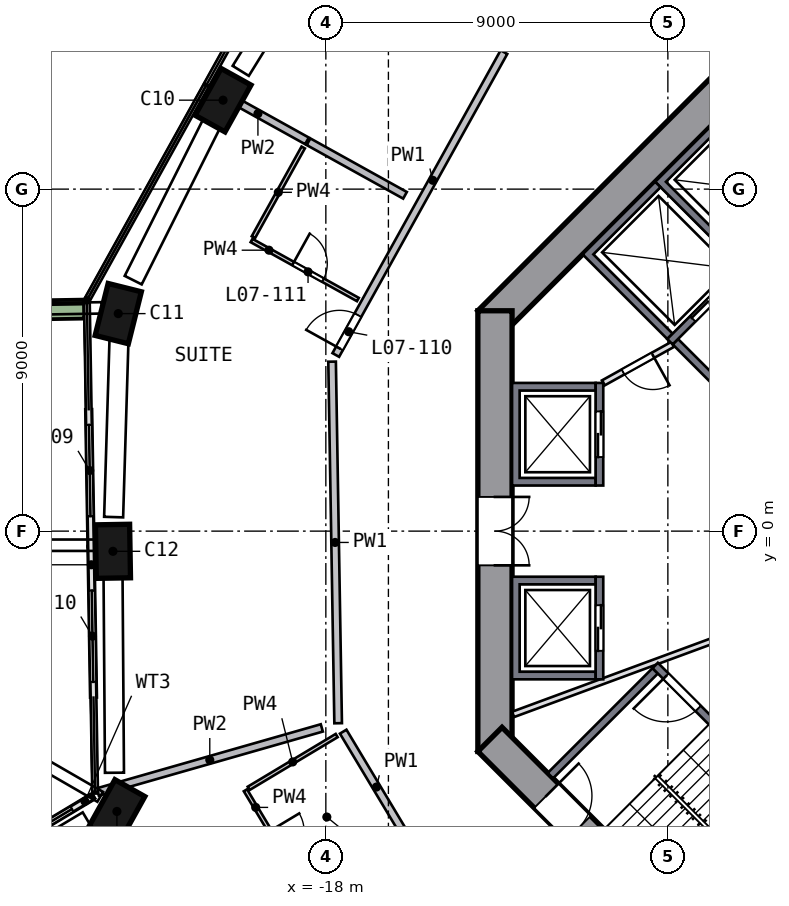
"""IFC4 building model, lengths in metres.
Left out: names, types, materials, properties, quantities, classifications, styles, units other than length and angle.
Written with IfcOpenShell. Run it as: python <this file> out.ifc"""

import sys

from ifc_helpers import new_model, si_unit, direction, frame, frame_2d, origin, origin_2d, place, context, subcontext, project, spatial, polyline, rectangle, outline, extrude, element, fill, save


model = new_model("IFC4")
c1 = context("Model", 3, precision=1e-05, world=origin(), true_north=direction((0.0, 1.0)))
c2 = subcontext(c1, "Body", "Model", "MODEL_VIEW")
j1 = project(units=[si_unit("LENGTHUNIT", "METRE"), si_unit("PLANEANGLEUNIT", "RADIAN")], contexts=[c1])
p1 = place(None, origin())
s1 = spatial("IfcSite", under=j1, at=p1, CompositionType="ELEMENT")
p2 = place(p1, origin())
s2 = spatial("IfcBuilding", under=s1, at=p2, CompositionType="ELEMENT")
p3 = place(p2, frame((0.0, 0.0, 39.0)))
s3 = spatial("IfcBuildingStorey", under=s2, at=p3, CompositionType="ELEMENT", Elevation=39.0)
p4 = place(p3, frame((-20.64, 11.46, 0.0), z_axis=(-0.053691551, -0.098637311, 0.99367394), x_axis=(-0.482457023, -0.868690978, -0.112299622)))
e1 = element("IfcColumn", 1, at=p4, inside=s3, PredefinedType="COLUMN", context=c2, shape_type="SweptSolid", body=[
    extrude(rectangle(XDim=1.4, YDim=0.9, at=origin_2d()), origin(), (0.0, 0.0, 1.0), 3.21),
])
p5 = place(p3, frame((-23.43, 5.859, 0.0), z_axis=(-0.026989812, -0.1116846, 0.993377119), x_axis=(0.241532608, 0.963566831, 0.114895435)))
e2 = element("IfcColumn", 2, at=p5, inside=s3, PredefinedType="COLUMN", context=c2, shape_type="SweptSolid", body=[
    extrude(rectangle(XDim=1.4, YDim=0.9, at=origin_2d()), origin(), (0.0, 0.0, 1.0), 3.211),
])
p6 = place(p3, frame((-23.605, -0.396, 0.0), z_axis=(0.002813845, -0.112325643, 0.993667466), x_axis=(0.016454511, -0.99353167, -0.112356888)))
e3 = element("IfcColumn", 3, at=p6, inside=s3, PredefinedType="COLUMN", context=c2, shape_type="SweptSolid", body=[
    extrude(rectangle(XDim=1.4, YDim=0.9, at=origin_2d()), origin(), (0.0, 0.0, 1.0), 3.21),
])
p7 = place(p3, frame((-23.54, -7.242, 0.0), z_axis=(0.035343639, -0.111655497, 0.993118259), x_axis=(0.490078093, 0.867986237, 0.080145834)))
e4 = element("IfcColumn", 4, at=p7, inside=s3, PredefinedType="COLUMN", context=c2, shape_type="SweptSolid", body=[
    extrude(rectangle(XDim=1.4, YDim=0.9, at=origin_2d()), origin(), (0.0, 0.0, 1.0), 3.212),
])
p8 = place(p3, frame((-5.481, 13.682, 0.0), z_axis=(0.0, 0.0, 1.0), x_axis=(-0.707106781, -0.707106781, 0.0)))
e5 = element("IfcWall", 5, at=p8, inside=s3, PredefinedType="SHEAR", context=c2, shape_type="SweptSolid", body=[
    extrude(rectangle(XDim=11.598, YDim=0.9, at=frame_2d((5.799, 0.0))), origin(), (0.0, 0.0, 1.0), 3.5),
])
p9 = place(p3, frame((-13.55, 5.799, 0.0), z_axis=(0.0, 0.0, 1.0), x_axis=(0.0, -1.0, 0.0)))
e6 = element("IfcWall", 6, at=p9, inside=s3, PredefinedType="SHEAR", context=c2, shape_type="SweptSolid", body=[
    extrude(rectangle(XDim=11.598, YDim=0.9, at=frame_2d((5.799, 0.0))), origin(), (0.0, 0.0, 1.0), 3.5),
])
p10 = place(p9, frame((4.899, 0.0, 0.0)))
e7 = element("IfcOpeningElement", 7, at=p10, cuts=e6, PredefinedType="OPENING", context=c2, shape_type="SweptSolid", body=[
    extrude(rectangle(XDim=1.8, YDim=2.1, at=frame_2d((0.9, 1.05))), frame((0.0, 0.46, 0.0), z_axis=(0.0, -1.0, 0.0), x_axis=(1.0, 0.0, 0.0)), (0.0, 0.0, 1.0), 0.92),
])
p11 = place(p3, frame((-13.682, -5.481, 0.0), z_axis=(0.0, 0.0, 1.0), x_axis=(0.707106781, -0.707106781, 0.0)))
e8 = element("IfcWall", 8, at=p11, inside=s3, PredefinedType="SHEAR", context=c2, shape_type="SweptSolid", body=[
    extrude(rectangle(XDim=11.598, YDim=0.9, at=frame_2d((5.799, 0.0))), origin(), (0.0, 0.0, 1.0), 3.5),
])
p12 = place(p11, frame((2.099, 0.0, 0.0)))
e9 = element("IfcOpeningElement", 9, at=p12, cuts=e8, PredefinedType="OPENING", context=c2, shape_type="SweptSolid", body=[
    extrude(rectangle(XDim=1.2, YDim=2.1, at=frame_2d((0.6, 1.05))), frame((0.0, 0.46, 0.0), z_axis=(0.0, -1.0, 0.0), x_axis=(1.0, 0.0, 0.0)), (0.0, 0.0, 1.0), 0.92),
])
p13 = place(p3, frame((-24.24, 3.194, 0.0), z_axis=(0.0, 0.0, 1.0), x_axis=(0.016750227, -0.999859705, 0.0)))
e10 = element("IfcWall", 10, at=p13, inside=s3, PredefinedType="SOLIDWALL", context=c2, shape_type="SweptSolid", body=[
    extrude(rectangle(XDim=3.6, YDim=0.15, at=frame_2d((1.8, 0.0))), origin(), (0.0, 0.0, 1.0), 2.425),
])
p14 = place(p13, frame((0.4, 0.0, 0.0)))
e11 = element("IfcOpeningElement", 11, at=p14, cuts=e10, PredefinedType="OPENING", context=c2, shape_type="SweptSolid", body=[
    extrude(rectangle(XDim=2.4, YDim=2.4, at=frame_2d((1.2, 1.2))), frame((0.0, 0.085, 0.0), z_axis=(0.0, -1.0, 0.0), x_axis=(1.0, 0.0, 0.0)), (0.0, 0.0, 1.0), 0.17),
])
p15 = place(p3, frame((-24.18, -0.405, 0.0), z_axis=(0.0, 0.0, 1.0), x_axis=(0.016767063, -0.999859423, 0.0)))
e12 = element("IfcWall", 12, at=p15, inside=s3, PredefinedType="SOLIDWALL", context=c2, shape_type="SweptSolid", body=[
    extrude(rectangle(XDim=3.96, YDim=0.15, at=frame_2d((1.98, 0.0))), origin(), (0.0, 0.0, 1.0), 2.425),
])
p16 = place(p15, frame((1.16, 0.0, 0.0)))
e13 = element("IfcOpeningElement", 13, at=p16, cuts=e12, PredefinedType="OPENING", context=c2, shape_type="SweptSolid", body=[
    extrude(rectangle(XDim=2.4, YDim=2.4, at=frame_2d((1.2, 1.2))), frame((0.0, 0.085, 0.0), z_axis=(0.0, -1.0, 0.0), x_axis=(1.0, 0.0, 0.0)), (0.0, 0.0, 1.0), 0.17),
])
p17 = place(p3, frame((-24.167, -7.006, 0.0), z_axis=(0.0, 0.0, 1.0), x_axis=(-0.857537249, -0.514421876, 0.0)))
e14 = element("IfcWall", 14, at=p17, inside=s3, PredefinedType="SOLIDWALL", context=c2, shape_type="SweptSolid", body=[
    extrude(rectangle(XDim=3.402, YDim=0.15, at=frame_2d((1.701, 0.0))), origin(), (0.0, 0.0, 1.0), 2.425),
])
p18 = place(p17, frame((0.602, 0.0, 0.0)))
e15 = element("IfcOpeningElement", 15, at=p18, cuts=e14, PredefinedType="OPENING", context=c2, shape_type="SweptSolid", body=[
    extrude(rectangle(XDim=2.4, YDim=2.4, at=frame_2d((1.2, 1.2))), frame((0.0, 0.085, 0.0), z_axis=(0.0, -1.0, 0.0), x_axis=(1.0, 0.0, 0.0)), (0.0, 0.0, 1.0), 0.17),
])
p19 = place(p3, frame((-24.361, 5.843, 0.0), z_axis=(0.0, 0.0, 1.0), x_axis=(-0.999859034, -0.016790244, 0.0)))
e16 = element("IfcWall", 16, at=p19, inside=s3, PredefinedType="SOLIDWALL", context=c2, shape_type="SweptSolid", body=[
    extrude(rectangle(XDim=3.199, YDim=0.5, at=frame_2d((1.6, 0.0))), origin(), (0.0, 0.0, 1.0), 0.7),
])
p20 = place(p3, origin())
e17 = element("IfcWall", 17, at=p20, inside=s3, PredefinedType="SOLIDWALL", context=c2, shape_type="SweptSolid", body=[
    extrude(outline(polyline([(-13.1, 3.9), (-10.9, 3.9), (-10.9, 3.7), (-12.9, 3.7), (-12.9, 1.4), (-10.9, 1.4), (-10.9, 1.2), (-13.1, 1.2), (-13.1, 3.9)])), origin(), (0.0, 0.0, 1.0), 3.19),
])
p21 = place(p3, frame((-10.8, 1.2, 0.0), z_axis=(0.0, 0.0, 1.0), x_axis=(0.0, 1.0, 0.0)))
e18 = element("IfcWall", 18, at=p21, inside=s3, PredefinedType="SOLIDWALL", context=c2, shape_type="SweptSolid", body=[
    extrude(rectangle(XDim=2.7, YDim=0.2, at=frame_2d((1.35, 0.0))), origin(), (0.0, 0.0, 1.0), 3.19),
])
p22 = place(p21, frame((0.75, 0.0, 0.0)))
e19 = element("IfcOpeningElement", 19, at=p22, cuts=e18, PredefinedType="OPENING", context=c2, shape_type="SweptSolid", body=[
    extrude(rectangle(XDim=1.2, YDim=2.1, at=frame_2d((0.6, 1.05))), frame((0.0, 0.11, 0.0), z_axis=(0.0, -1.0, 0.0), x_axis=(1.0, 0.0, 0.0)), (0.0, 0.0, 1.0), 0.22),
])
p23 = place(p3, origin())
e20 = element("IfcWall", 20, at=p23, inside=s3, PredefinedType="SOLIDWALL", context=c2, shape_type="SweptSolid", body=[
    extrude(outline(polyline([(-13.1, -3.9), (-13.1, -1.2), (-10.9, -1.2), (-10.9, -1.4), (-12.9, -1.4), (-12.9, -3.7), (-10.9, -3.7), (-10.9, -3.9), (-13.1, -3.9)])), origin(), (0.0, 0.0, 1.0), 3.19),
])
p24 = place(p3, frame((-10.8, -1.2, 0.0), z_axis=(0.0, 0.0, 1.0), x_axis=(0.0, -1.0, 0.0)))
e21 = element("IfcWall", 21, at=p24, inside=s3, PredefinedType="SOLIDWALL", context=c2, shape_type="SweptSolid", body=[
    extrude(rectangle(XDim=2.7, YDim=0.2, at=frame_2d((1.35, 0.0))), origin(), (0.0, 0.0, 1.0), 3.19),
])
p25 = place(p24, frame((0.75, 0.0, 0.0)))
e22 = element("IfcOpeningElement", 22, at=p25, cuts=e21, PredefinedType="OPENING", context=c2, shape_type="SweptSolid", body=[
    extrude(rectangle(XDim=1.2, YDim=2.1, at=frame_2d((0.6, 1.05))), frame((0.0, 0.11, 0.0), z_axis=(0.0, -1.0, 0.0), x_axis=(1.0, 0.0, 0.0)), (0.0, 0.0, 1.0), 0.22),
])
p26 = place(p3, origin())
e23 = element("IfcWall", 23, at=p26, inside=s3, PredefinedType="SOLIDWALL", context=c2, shape_type="SweptSolid", body=[
    extrude(outline(polyline([(-9.334, 9.192), (-7.283, 11.243), (-5.056, 9.016), (-5.197, 8.874), (-7.283, 10.96), (-9.051, 9.192), (-6.965, 7.106), (-7.106, 6.965), (-9.334, 9.192)])), origin(), (0.0, 0.0, 1.0), 3.19),
])
p27 = place(p3, origin())
e24 = element("IfcWall", 24, at=p27, inside=s3, PredefinedType="SOLIDWALL", context=c2, shape_type="SweptSolid", body=[
    extrude(outline(polyline([(-11.243, 7.283), (-9.334, 9.192), (-9.192, 9.051), (-10.96, 7.283), (-8.874, 5.197), (-9.016, 5.056), (-11.243, 7.283)])), origin(), (0.0, 0.0, 1.0), 3.19),
])
p28 = place(p3, frame((-7.036, 6.894, 0.0), z_axis=(0.0, 0.0, 1.0), x_axis=(-0.707106781, -0.707106781, 0.0)))
e25 = element("IfcWall", 25, at=p28, inside=s3, PredefinedType="SOLIDWALL", context=c2, shape_type="SweptSolid", body=[
    extrude(rectangle(XDim=2.7, YDim=0.2, at=frame_2d((1.35, 0.0))), origin(), (0.0, 0.0, 1.0), 3.19),
])
p29 = place(p28, frame((0.65, 0.0, 0.0)))
e26 = element("IfcOpeningElement", 26, at=p29, cuts=e25, PredefinedType="OPENING", context=c2, shape_type="SweptSolid", body=[
    extrude(rectangle(XDim=1.2, YDim=2.1, at=frame_2d((0.6, 1.05))), frame((0.0, 0.11, 0.0), z_axis=(0.0, -1.0, 0.0), x_axis=(1.0, 0.0, 0.0)), (0.0, 0.0, 1.0), 0.22),
])
p30 = place(p3, frame((-3.535, -9.334, 0.0), z_axis=(0.0, 0.0, 1.0), x_axis=(-0.707106781, 0.707106781, 0.0)))
e27 = element("IfcWall", 27, at=p30, inside=s3, PredefinedType="SOLIDWALL", context=c2, shape_type="SweptSolid", body=[
    extrude(rectangle(XDim=8.2, YDim=0.2, at=frame_2d((4.1, 0.0))), origin(), (0.0, 0.0, 1.0), 3.19),
])
p31 = place(p30, frame((6.6, 0.0, 0.0)))
e28 = element("IfcOpeningElement", 28, at=p31, cuts=e27, PredefinedType="OPENING", context=c2, shape_type="SweptSolid", body=[
    extrude(rectangle(XDim=1.2, YDim=2.1, at=frame_2d((0.6, 1.05))), frame((0.0, 0.11, 0.0), z_axis=(0.0, -1.0, 0.0), x_axis=(1.0, 0.0, 0.0)), (0.0, 0.0, 1.0), 0.22),
])
p32 = place(p3, frame((-9.334, -3.677, 0.0), z_axis=(0.0, 0.0, 1.0), x_axis=(-0.707106781, -0.707106781, 0.0)))
e29 = element("IfcWall", 29, at=p32, inside=s3, PredefinedType="SOLIDWALL", context=c2, shape_type="SweptSolid", body=[
    extrude(rectangle(XDim=3.9, YDim=0.2, at=frame_2d((1.95, 0.0))), origin(), (0.0, 0.0, 1.0), 3.19),
])
p33 = place(p3, frame((-6.823, 3.005, 0.0), z_axis=(0.0, 0.0, 1.0), x_axis=(-0.707106781, 0.707106781, 0.0)))
e30 = element("IfcWall", 30, at=p33, inside=s3, PredefinedType="SOLIDWALL", context=c2, shape_type="SweptSolid", body=[
    extrude(rectangle(XDim=2.8, YDim=0.2, at=frame_2d((1.4, 0.0))), origin(), (0.0, 0.0, 1.0), 3.19),
])
p34 = place(p3, frame((-8.874, 4.914, 0.0), z_axis=(0.0, 0.0, 1.0), x_axis=(-0.874129705, -0.485692555, 0.0)))
e31 = element("IfcWall", 31, at=p34, inside=s3, PredefinedType="PARTITIONING", context=c2, shape_type="SweptSolid", body=[
    extrude(rectangle(XDim=2.089, YDim=0.15, at=frame_2d((1.044, 0.0))), origin(), (0.0, 0.0, 1.0), 3.19),
])
p35 = place(p34, frame((0.594, 0.0, 0.0)))
e32 = element("IfcOpeningElement", 32, at=p35, cuts=e31, PredefinedType="OPENING", context=c2, shape_type="SweptSolid", body=[
    extrude(rectangle(XDim=0.9, YDim=2.1, at=frame_2d((0.45, 1.05))), frame((0.0, 0.085, 0.0), z_axis=(0.0, -1.0, 0.0), x_axis=(1.0, 0.0, 0.0)), (0.0, 0.0, 1.0), 0.17),
])
p36 = place(p3, frame((-4.813, -1.776, 0.0), z_axis=(0.0, 0.0, 1.0), x_axis=(-0.93819293, -0.346112737, 0.0)))
e33 = element("IfcWall", 33, at=p36, inside=s3, PredefinedType="PARTITIONING", context=c2, shape_type="SweptSolid", body=[
    extrude(rectangle(XDim=8.803, YDim=0.15, at=frame_2d((4.402, 0.0))), origin(), (0.0, 0.0, 1.0), 3.19),
])
p37 = place(p36, frame((1.4, 0.0, 0.0)))
e34 = element("IfcOpeningElement", 34, at=p37, cuts=e33, PredefinedType="OPENING", context=c2, shape_type="SweptSolid", body=[
    extrude(rectangle(XDim=1.8, YDim=2.1, at=frame_2d((0.9, 1.05))), frame((0.0, 0.085, 0.0), z_axis=(0.0, -1.0, 0.0), x_axis=(1.0, 0.0, 0.0)), (0.0, 0.0, 1.0), 0.17),
])
p38 = place(p3, frame((-17.836, 4.46, 0.0), z_axis=(0.0, 0.0, 1.0), x_axis=(0.016778486, -0.999859231, 0.0)))
e35 = element("IfcWall", 35, at=p38, inside=s3, PredefinedType="SOLIDWALL", context=c2, shape_type="SweptSolid", body=[
    extrude(rectangle(XDim=9.516, YDim=0.2, at=frame_2d((4.758, 0.0))), origin(), (0.0, 0.0, 1.0), 3.19),
])
p39 = place(p3, frame((-17.543, -5.277, 0.0), z_axis=(0.0, 0.0, 1.0), x_axis=(0.514400718, -0.857549941, 0.0)))
e36 = element("IfcWall", 36, at=p39, inside=s3, PredefinedType="SOLIDWALL", context=c2, shape_type="SweptSolid", body=[
    extrude(rectangle(XDim=3.4, YDim=0.2, at=frame_2d((1.7, 0.0))), origin(), (0.0, 0.0, 1.0), 3.19),
])
p40 = place(p3, frame((-17.738, 4.635, 0.0), z_axis=(0.0, 0.0, 1.0), x_axis=(0.485438257, 0.874270953, 0.0)))
e37 = element("IfcWall", 37, at=p40, inside=s3, PredefinedType="SOLIDWALL", context=c2, shape_type="SweptSolid", body=[
    extrude(rectangle(XDim=9.115, YDim=0.2, at=frame_2d((4.558, 0.0))), origin(), (0.0, 0.0, 1.0), 3.19),
])
p41 = place(p40, frame((0.2, 0.0, 0.0)))
e38 = element("IfcOpeningElement", 38, at=p41, cuts=e37, PredefinedType="OPENING", context=c2, shape_type="SweptSolid", body=[
    extrude(rectangle(XDim=1.0, YDim=2.1, at=frame_2d((0.5, 1.05))), frame((0.0, 0.11, 0.0), z_axis=(0.0, -1.0, 0.0), x_axis=(1.0, 0.0, 0.0)), (0.0, 0.0, 1.0), 0.22),
])
p42 = place(p3, frame((-18.106, -5.178, 0.0), z_axis=(0.0, 0.0, 1.0), x_axis=(-0.961454804, -0.274963015, 0.0)))
e39 = element("IfcWall", 39, at=p42, inside=s3, PredefinedType="SOLIDWALL", context=c2, shape_type="SweptSolid", body=[
    extrude(rectangle(XDim=6.132, YDim=0.2, at=frame_2d((3.066, 0.0))), origin(), (0.0, 0.0, 1.0), 3.19),
])
p43 = place(p3, frame((-18.497, 10.27, 0.0), z_axis=(0.0, 0.0, 1.0), x_axis=(-0.874289886, 0.485404157, 0.0)))
e40 = element("IfcWall", 40, at=p43, inside=s3, PredefinedType="SOLIDWALL", context=c2, shape_type="SweptSolid", body=[
    extrude(rectangle(XDim=2.952, YDim=0.2, at=frame_2d((1.476, 0.0))), origin(), (0.0, 0.0, 1.0), 3.19),
])
p44 = place(p3, frame((-15.917, 8.837, 0.0), z_axis=(0.0, 0.0, 1.0), x_axis=(-0.874296003, 0.485393138, 0.0)))
e41 = element("IfcWall", 41, at=p44, inside=s3, PredefinedType="SOLIDWALL", context=c2, shape_type="SweptSolid", body=[
    extrude(rectangle(XDim=2.905, YDim=0.2, at=frame_2d((1.452, 0.0))), origin(), (0.0, 0.0, 1.0), 3.19),
])
p45 = place(p3, frame((-20.116, -6.82, 0.0), z_axis=(0.0, 0.0, 1.0), x_axis=(0.514439657, -0.857526582, 0.0)))
e42 = element("IfcWall", 42, at=p45, inside=s3, PredefinedType="PARTITIONING", context=c2, shape_type="SweptSolid", body=[
    extrude(rectangle(XDim=3.2, YDim=0.1, at=frame_2d((1.6, 0.0))), origin(), (0.0, 0.0, 1.0), 3.19),
])
p46 = place(p45, frame((1.25, 0.0, 0.0)))
e43 = element("IfcOpeningElement", 43, at=p46, cuts=e42, PredefinedType="OPENING", context=c2, shape_type="SweptSolid", body=[
    extrude(rectangle(XDim=0.9, YDim=2.1, at=frame_2d((0.45, 1.05))), frame((0.0, 0.06, 0.0), z_axis=(0.0, -1.0, 0.0), x_axis=(1.0, 0.0, 0.0)), (0.0, 0.0, 1.0), 0.12),
])
p47 = place(p3, frame((-19.906, 7.735, 0.0), z_axis=(0.0, 0.0, 1.0), x_axis=(0.485427932, 0.874276685, 0.0)))
e44 = element("IfcWall", 44, at=p47, inside=s3, PredefinedType="PARTITIONING", context=c2, shape_type="SweptSolid", body=[
    extrude(rectangle(XDim=2.7, YDim=0.1, at=frame_2d((1.35, 0.0))), origin(), (0.0, 0.0, 1.0), 3.19),
])
p48 = place(p3, frame((-20.03, -6.769, 0.0), z_axis=(0.0, 0.0, 1.0), x_axis=(0.857548769, 0.514402672, 0.0)))
e45 = element("IfcWall", 45, at=p48, inside=s3, PredefinedType="PARTITIONING", context=c2, shape_type="SweptSolid", body=[
    extrude(rectangle(XDim=2.7, YDim=0.1, at=frame_2d((1.35, 0.0))), origin(), (0.0, 0.0, 1.0), 3.19),
])
p49 = place(p3, frame((-19.955, 7.648, 0.0), z_axis=(0.0, 0.0, 1.0), x_axis=(0.874290404, -0.485403224, 0.0)))
e46 = element("IfcWall", 46, at=p49, inside=s3, PredefinedType="PARTITIONING", context=c2, shape_type="SweptSolid", body=[
    extrude(rectangle(XDim=3.2, YDim=0.1, at=frame_2d((1.6, 0.0))), origin(), (0.0, 0.0, 1.0), 3.19),
])
p50 = place(p49, frame((1.25, 0.0, 0.0)))
e47 = element("IfcOpeningElement", 47, at=p50, cuts=e46, PredefinedType="OPENING", context=c2, shape_type="SweptSolid", body=[
    extrude(rectangle(XDim=0.9, YDim=2.1, at=frame_2d((0.45, 1.05))), frame((0.0, 0.06, 0.0), z_axis=(0.0, -1.0, 0.0), x_axis=(1.0, 0.0, 0.0)), (0.0, 0.0, 1.0), 0.12),
])
p51 = place(p14, origin())
e48 = element("IfcDoor", 48, at=p51, inside=s3, OperationType="SLIDING_TO_RIGHT", PredefinedType="DOOR", context=c2, shape_type="SweptSolid", body=[
    extrude(rectangle(XDim=2.4, YDim=2.4, at=frame_2d((1.2, 1.2))), frame((0.0, 0.025, 0.0), z_axis=(0.0, -1.0, 0.0), x_axis=(1.0, 0.0, 0.0)), (0.0, 0.0, 1.0), 0.05),
])
fill(e11, e48)
p52 = place(p16, origin())
e49 = element("IfcDoor", 49, at=p52, inside=s3, OperationType="SLIDING_TO_LEFT", PredefinedType="DOOR", context=c2, shape_type="SweptSolid", body=[
    extrude(rectangle(XDim=2.4, YDim=2.4, at=frame_2d((1.2, 1.2))), frame((0.0, 0.025, 0.0), z_axis=(0.0, -1.0, 0.0), x_axis=(1.0, 0.0, 0.0)), (0.0, 0.0, 1.0), 0.05),
])
fill(e13, e49)
p53 = place(p18, origin())
e50 = element("IfcDoor", 50, at=p53, inside=s3, OperationType="SLIDING_TO_LEFT", PredefinedType="DOOR", context=c2, shape_type="SweptSolid", body=[
    extrude(rectangle(XDim=2.4, YDim=2.4, at=frame_2d((1.2, 1.2))), frame((0.0, 0.025, 0.0), z_axis=(0.0, -1.0, 0.0), x_axis=(1.0, 0.0, 0.0)), (0.0, 0.0, 1.0), 0.05),
])
fill(e15, e50)
p54 = place(p22, origin())
e51 = element("IfcDoor", 51, at=p54, inside=s3, OperationType="DOUBLE_DOOR_SLIDING", PredefinedType="DOOR", context=c2, shape_type="SweptSolid", body=[
    extrude(rectangle(XDim=1.2, YDim=2.1, at=frame_2d((0.6, 1.05))), frame((0.0, 0.025, 0.0), z_axis=(0.0, -1.0, 0.0), x_axis=(1.0, 0.0, 0.0)), (0.0, 0.0, 1.0), 0.05),
])
fill(e19, e51)
p55 = place(p25, origin())
e52 = element("IfcDoor", 52, at=p55, inside=s3, OperationType="DOUBLE_DOOR_SLIDING", PredefinedType="DOOR", context=c2, shape_type="SweptSolid", body=[
    extrude(rectangle(XDim=1.2, YDim=2.1, at=frame_2d((0.6, 1.05))), frame((0.0, 0.025, 0.0), z_axis=(0.0, -1.0, 0.0), x_axis=(1.0, 0.0, 0.0)), (0.0, 0.0, 1.0), 0.05),
])
fill(e22, e52)
p56 = place(p29, origin())
e53 = element("IfcDoor", 53, at=p56, inside=s3, OperationType="DOUBLE_DOOR_SLIDING", PredefinedType="DOOR", context=c2, shape_type="SweptSolid", body=[
    extrude(rectangle(XDim=1.2, YDim=2.1, at=frame_2d((0.6, 1.05))), frame((0.0, 0.025, 0.0), z_axis=(0.0, -1.0, 0.0), x_axis=(1.0, 0.0, 0.0)), (0.0, 0.0, 1.0), 0.05),
])
fill(e26, e53)
p57 = place(p31, origin())
e54 = element("IfcDoor", 54, at=p57, inside=s3, OperationType="SINGLE_SWING_RIGHT", PredefinedType="DOOR", context=c2, shape_type="SweptSolid", body=[
    extrude(rectangle(XDim=1.2, YDim=2.1, at=frame_2d((0.6, 1.05))), frame((0.0, 0.025, 0.0), z_axis=(0.0, -1.0, 0.0), x_axis=(1.0, 0.0, 0.0)), (0.0, 0.0, 1.0), 0.05),
])
fill(e28, e54)
p58 = place(p10, origin())
e55 = element("IfcDoor", 55, at=p58, inside=s3, OperationType="DOUBLE_DOOR_SINGLE_SWING", PredefinedType="DOOR", context=c2, shape_type="SweptSolid", body=[
    extrude(rectangle(XDim=1.8, YDim=2.1, at=frame_2d((0.9, 1.05))), frame((0.0, 0.025, 0.0), z_axis=(0.0, -1.0, 0.0), x_axis=(1.0, 0.0, 0.0)), (0.0, 0.0, 1.0), 0.05),
])
fill(e7, e55)
p59 = place(p12, origin())
e56 = element("IfcDoor", 56, at=p59, inside=s3, OperationType="SINGLE_SWING_LEFT", PredefinedType="DOOR", context=c2, shape_type="SweptSolid", body=[
    extrude(rectangle(XDim=1.2, YDim=2.1, at=frame_2d((0.6, 1.05))), frame((0.0, 0.025, 0.0), z_axis=(0.0, -1.0, 0.0), x_axis=(1.0, 0.0, 0.0)), (0.0, 0.0, 1.0), 0.05),
])
fill(e9, e56)
p60 = place(p35, origin())
e57 = element("IfcDoor", 57, at=p60, inside=s3, OperationType="SINGLE_SWING_LEFT", PredefinedType="DOOR", context=c2, shape_type="SweptSolid", body=[
    extrude(rectangle(XDim=0.9, YDim=2.1, at=frame_2d((0.45, 1.05))), frame((0.0, 0.025, 0.0), z_axis=(0.0, -1.0, 0.0), x_axis=(1.0, 0.0, 0.0)), (0.0, 0.0, 1.0), 0.05),
])
fill(e32, e57)
p61 = place(p41, origin())
e58 = element("IfcDoor", 58, at=p61, inside=s3, OperationType="SINGLE_SWING_LEFT", PredefinedType="DOOR", context=c2, shape_type="SweptSolid", body=[
    extrude(rectangle(XDim=1.0, YDim=2.1, at=frame_2d((0.5, 1.05))), frame((0.0, 0.025, 0.0), z_axis=(0.0, -1.0, 0.0), x_axis=(1.0, 0.0, 0.0)), (0.0, 0.0, 1.0), 0.05),
])
fill(e38, e58)
p62 = place(p50, origin())
e59 = element("IfcDoor", 59, at=p62, inside=s3, OperationType="SINGLE_SWING_LEFT", PredefinedType="DOOR", context=c2, shape_type="SweptSolid", body=[
    extrude(rectangle(XDim=0.9, YDim=2.1, at=frame_2d((0.45, 1.05))), frame((0.0, 0.025, 0.0), z_axis=(0.0, -1.0, 0.0), x_axis=(1.0, 0.0, 0.0)), (0.0, 0.0, 1.0), 0.05),
])
fill(e47, e59)
save(model, sys.argv[1])
